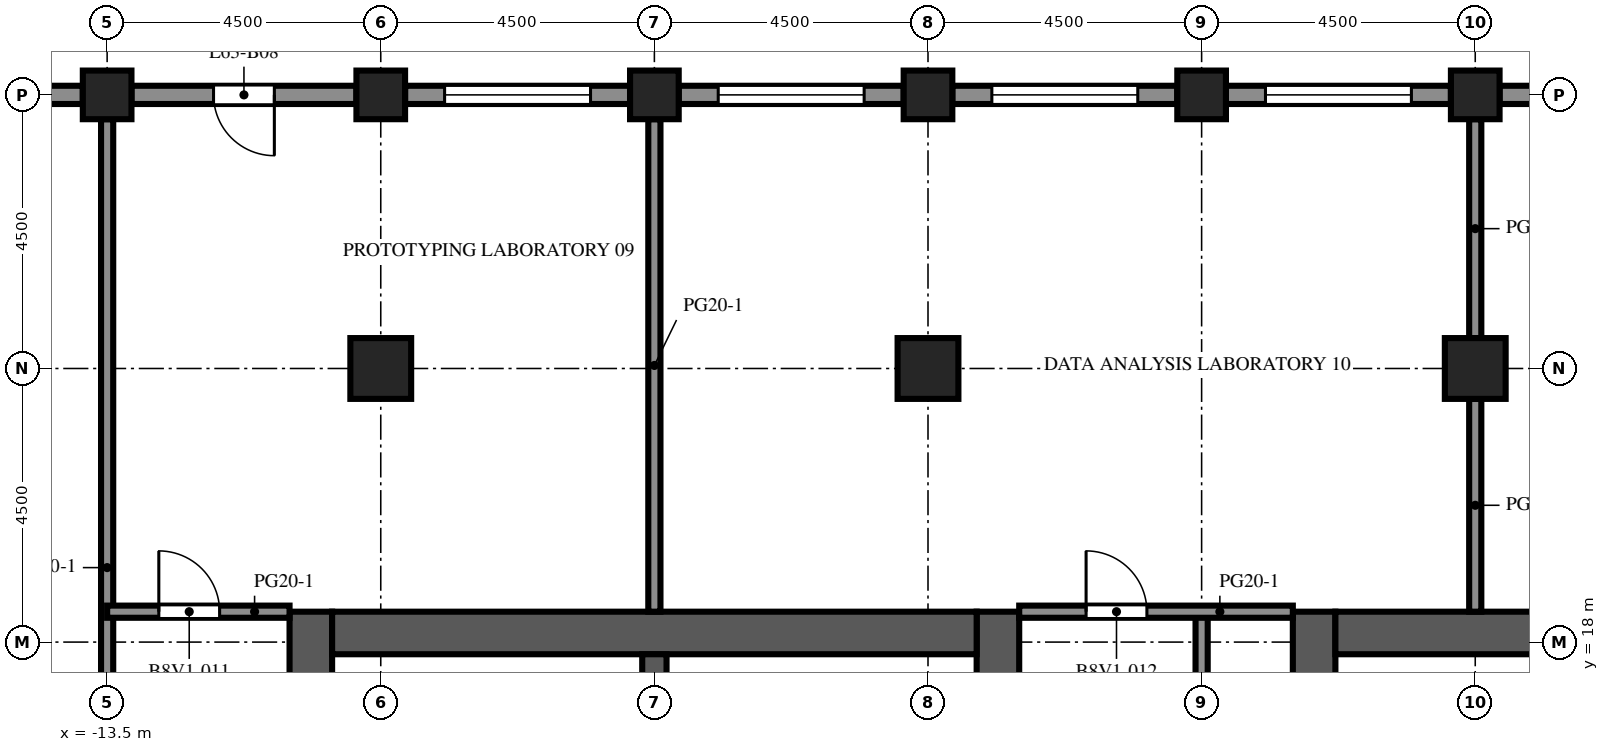
"""IFC4 building model, lengths in metres.
Left out: names, types, materials, properties, quantities, classifications, styles, units other than length and angle.
Written with IfcOpenShell. Run it as: python <this file> out.ifc"""

import sys

from ifc_helpers import new_model, si_unit, direction, frame, frame_2d, origin, origin_2d, place, context, subcontext, project, spatial, rectangle, extrude, element, fill, save


model = new_model("IFC4")
c1 = context("Model", 3, precision=1e-05, world=origin(), true_north=direction((0.0, 1.0)))
c2 = subcontext(c1, "Body", "Model", "MODEL_VIEW")
j1 = project(units=[si_unit("LENGTHUNIT", "METRE"), si_unit("PLANEANGLEUNIT", "RADIAN")], contexts=[c1])
p1 = place(None, origin())
s1 = spatial("IfcSite", under=j1, at=p1, CompositionType="ELEMENT")
p2 = place(p1, origin())
s2 = spatial("IfcBuilding", under=s1, at=p2, CompositionType="ELEMENT")
p3 = place(p2, frame((0.0, 0.0, 278.6)))
s3 = spatial("IfcBuildingStorey", under=s2, at=p3, CompositionType="ELEMENT", Elevation=278.6)
for number, where, z_axis, x_axis in (
    (1, (-13.5, 27.0, 0.0), (0.0, 0.0, 1.0), (1.0, 0.0, 0.0)),
    (2, (-9.0, 27.0, 0.0), (0.0, 0.0, 1.0), (1.0, 0.0, 0.0)),
    (3, (-4.5, 27.0, 0.0), (0.0, 0.0, 1.0), (1.0, 0.0, 0.0)),
    (4, (0.0, 27.0, 0.0), (0.0, 0.0, 1.0), (1.0, 0.0, 0.0)),
    (5, (4.5, 27.0, 0.0), (0.0, 0.0, 1.0), (1.0, 0.0, 0.0)),
    (6, (9.0, 27.0, 0.0), (0.0, 0.0, 1.0), (1.0, 0.0, 0.0)),
):
    element("IfcColumn", number, at=place(p3, frame(where, z_axis=z_axis, x_axis=x_axis)), inside=s3, PredefinedType="COLUMN", context=c2, shape_type="SweptSolid", body=[
        extrude(rectangle(XDim=0.8, YDim=0.8, at=origin_2d()), origin(), (0.0, 0.0, 1.0), 4.1),
    ])
for number, where, z_axis, x_axis in (
    (7, (-9.0, 22.5, 0.0), (0.0, 0.0, 1.0), (1.0, 0.0, 0.0)),
    (8, (0.0, 22.5, 0.0), (0.0, 0.0, 1.0), (1.0, 0.0, 0.0)),
    (9, (9.0, 22.5, 0.0), (0.0, 0.0, 1.0), (1.0, 0.0, 0.0)),
):
    element("IfcColumn", number, at=place(p3, frame(where, z_axis=z_axis, x_axis=x_axis)), inside=s3, PredefinedType="COLUMN", context=c2, shape_type="SweptSolid", body=[
        extrude(rectangle(XDim=1.0, YDim=1.0, at=origin_2d()), origin(), (0.0, 0.0, 1.0), 4.1),
    ])
p4 = place(p3, frame((-10.15, -9.0, 0.0), z_axis=(0.0, 0.0, 1.0), x_axis=(0.0, 1.0, 0.0)))
e10 = element("IfcWall", 10, at=p4, inside=s3, PredefinedType="SHEAR", context=c2, shape_type="SweptSolid", body=[
    extrude(rectangle(XDim=27.5, YDim=0.7, at=frame_2d((13.75, 0.0))), origin(), (0.0, 0.0, 1.0), 4.1),
])
p5 = place(p4, frame((12.55, 0.0, 0.0)))
e11 = element("IfcOpeningElement", 11, at=p5, cuts=e10, PredefinedType="OPENING", context=c2, shape_type="SweptSolid", body=[
    extrude(rectangle(XDim=2.4, YDim=2.4, at=frame_2d((1.2, 1.2))), frame((0.0, 0.36, 0.0), z_axis=(0.0, -1.0, 0.0), x_axis=(1.0, 0.0, 0.0)), (0.0, 0.0, 1.0), 0.72),
])
p6 = place(p4, frame((6.825, 0.0, 0.0)))
e12 = element("IfcOpeningElement", 12, at=p6, cuts=e10, PredefinedType="OPENING", context=c2, shape_type="SweptSolid", body=[
    extrude(rectangle(XDim=1.2, YDim=2.1, at=frame_2d((0.6, 1.05))), frame((0.0, 0.36, 0.0), z_axis=(0.0, -1.0, 0.0), x_axis=(1.0, 0.0, 0.0)), (0.0, 0.0, 1.0), 0.72),
])
p7 = place(p4, frame((19.475, 0.0, 0.0)))
e13 = element("IfcOpeningElement", 13, at=p7, cuts=e10, PredefinedType="OPENING", context=c2, shape_type="SweptSolid", body=[
    extrude(rectangle(XDim=1.2, YDim=2.1, at=frame_2d((0.6, 1.05))), frame((0.0, 0.36, 0.0), z_axis=(0.0, -1.0, 0.0), x_axis=(1.0, 0.0, 0.0)), (0.0, 0.0, 1.0), 0.72),
])
p8 = place(p3, frame((1.15, -9.0, 0.0), z_axis=(0.0, 0.0, 1.0), x_axis=(0.0, 1.0, 0.0)))
e14 = element("IfcWall", 14, at=p8, inside=s3, PredefinedType="SHEAR", context=c2, shape_type="SweptSolid", body=[
    extrude(rectangle(XDim=27.5, YDim=0.7, at=frame_2d((13.75, 0.0))), origin(), (0.0, 0.0, 1.0), 4.1),
])
p9 = place(p8, frame((12.55, 0.0, 0.0)))
e15 = element("IfcOpeningElement", 15, at=p9, cuts=e14, PredefinedType="OPENING", context=c2, shape_type="SweptSolid", body=[
    extrude(rectangle(XDim=2.4, YDim=2.4, at=frame_2d((1.2, 1.2))), frame((0.0, 0.36, 0.0), z_axis=(0.0, -1.0, 0.0), x_axis=(1.0, 0.0, 0.0)), (0.0, 0.0, 1.0), 0.72),
])
p10 = place(p8, frame((3.9, 0.0, 0.0)))
e16 = element("IfcOpeningElement", 16, at=p10, cuts=e14, PredefinedType="OPENING", context=c2, shape_type="SweptSolid", body=[
    extrude(rectangle(XDim=1.2, YDim=2.1, at=frame_2d((0.6, 1.05))), frame((0.0, 0.36, 0.0), z_axis=(0.0, -1.0, 0.0), x_axis=(1.0, 0.0, 0.0)), (0.0, 0.0, 1.0), 0.72),
])
p11 = place(p8, frame((19.46, 0.0, 0.0)))
e17 = element("IfcOpeningElement", 17, at=p11, cuts=e14, PredefinedType="OPENING", context=c2, shape_type="SweptSolid", body=[
    extrude(rectangle(XDim=1.0, YDim=2.1, at=frame_2d((0.5, 1.05))), frame((0.0, 0.36, 0.0), z_axis=(0.0, -1.0, 0.0), x_axis=(1.0, 0.0, 0.0)), (0.0, 0.0, 1.0), 0.72),
])
p12 = place(p8, frame((21.17, 0.0, 0.0)))
e18 = element("IfcOpeningElement", 18, at=p12, cuts=e14, PredefinedType="OPENING", context=c2, shape_type="SweptSolid", body=[
    extrude(rectangle(XDim=1.0, YDim=2.1, at=frame_2d((0.5, 1.05))), frame((0.0, 0.36, 0.0), z_axis=(0.0, -1.0, 0.0), x_axis=(1.0, 0.0, 0.0)), (0.0, 0.0, 1.0), 0.72),
])
p13 = place(p8, frame((23.26, 0.0, 0.0)))
e19 = element("IfcOpeningElement", 19, at=p13, cuts=e14, PredefinedType="OPENING", context=c2, shape_type="SweptSolid", body=[
    extrude(rectangle(XDim=1.0, YDim=2.1, at=frame_2d((0.5, 1.05))), frame((0.0, 0.36, 0.0), z_axis=(0.0, -1.0, 0.0), x_axis=(1.0, 0.0, 0.0)), (0.0, 0.0, 1.0), 0.72),
])
p14 = place(p8, frame((25.35, 0.0, 0.0)))
e20 = element("IfcOpeningElement", 20, at=p14, cuts=e14, PredefinedType="OPENING", context=c2, shape_type="SweptSolid", body=[
    extrude(rectangle(XDim=1.0, YDim=2.1, at=frame_2d((0.5, 1.05))), frame((0.0, 0.36, 0.0), z_axis=(0.0, -1.0, 0.0), x_axis=(1.0, 0.0, 0.0)), (0.0, 0.0, 1.0), 0.72),
])
p15 = place(p3, frame((-9.8, 18.15, 0.0), z_axis=(0.0, 0.0, 1.0), x_axis=(1.0, 0.0, 0.0)))
e21 = element("IfcWall", 21, at=p15, inside=s3, PredefinedType="SHEAR", context=c2, shape_type="SweptSolid", body=[
    extrude(rectangle(XDim=10.6, YDim=0.7, at=frame_2d((5.3, 0.0))), origin(), (0.0, 0.0, 1.0), 4.1),
])
p16 = place(p3, frame((-4.5, 10.2, 0.0), z_axis=(0.0, 0.0, 1.0), x_axis=(0.0, 1.0, 0.0)))
e22 = element("IfcWall", 22, at=p16, inside=s3, PredefinedType="SHEAR", context=c2, shape_type="SweptSolid", body=[
    extrude(rectangle(XDim=7.6, YDim=0.4, at=frame_2d((3.8, 0.0))), origin(), (0.0, 0.0, 1.0), 4.1),
])
p17 = place(p3, frame((6.35, -9.0, 0.0), z_axis=(0.0, 0.0, 1.0), x_axis=(0.0, 1.0, 0.0)))
e23 = element("IfcWall", 23, at=p17, inside=s3, PredefinedType="SHEAR", context=c2, shape_type="SweptSolid", body=[
    extrude(rectangle(XDim=27.5, YDim=0.7, at=frame_2d((13.75, 0.0))), origin(), (0.0, 0.0, 1.0), 4.1),
])
p18 = place(p17, frame((12.55, 0.0, 0.0)))
e24 = element("IfcOpeningElement", 24, at=p18, cuts=e23, PredefinedType="OPENING", context=c2, shape_type="SweptSolid", body=[
    extrude(rectangle(XDim=2.4, YDim=2.4, at=frame_2d((1.2, 1.2))), frame((0.0, 0.36, 0.0), z_axis=(0.0, -1.0, 0.0), x_axis=(1.0, 0.0, 0.0)), (0.0, 0.0, 1.0), 0.72),
])
p19 = place(p17, frame((3.9, 0.0, 0.0)))
e25 = element("IfcOpeningElement", 25, at=p19, cuts=e23, PredefinedType="OPENING", context=c2, shape_type="SweptSolid", body=[
    extrude(rectangle(XDim=1.2, YDim=2.1, at=frame_2d((0.6, 1.05))), frame((0.0, 0.36, 0.0), z_axis=(0.0, -1.0, 0.0), x_axis=(1.0, 0.0, 0.0)), (0.0, 0.0, 1.0), 0.72),
])
p20 = place(p17, frame((19.46, 0.0, 0.0)))
e26 = element("IfcOpeningElement", 26, at=p20, cuts=e23, PredefinedType="OPENING", context=c2, shape_type="SweptSolid", body=[
    extrude(rectangle(XDim=1.0, YDim=2.1, at=frame_2d((0.5, 1.05))), frame((0.0, 0.36, 0.0), z_axis=(0.0, -1.0, 0.0), x_axis=(1.0, 0.0, 0.0)), (0.0, 0.0, 1.0), 0.72),
])
p21 = place(p17, frame((21.17, 0.0, 0.0)))
e27 = element("IfcOpeningElement", 27, at=p21, cuts=e23, PredefinedType="OPENING", context=c2, shape_type="SweptSolid", body=[
    extrude(rectangle(XDim=1.0, YDim=2.1, at=frame_2d((0.5, 1.05))), frame((0.0, 0.36, 0.0), z_axis=(0.0, -1.0, 0.0), x_axis=(1.0, 0.0, 0.0)), (0.0, 0.0, 1.0), 0.72),
])
p22 = place(p17, frame((23.26, 0.0, 0.0)))
e28 = element("IfcOpeningElement", 28, at=p22, cuts=e23, PredefinedType="OPENING", context=c2, shape_type="SweptSolid", body=[
    extrude(rectangle(XDim=1.0, YDim=2.1, at=frame_2d((0.5, 1.05))), frame((0.0, 0.36, 0.0), z_axis=(0.0, -1.0, 0.0), x_axis=(1.0, 0.0, 0.0)), (0.0, 0.0, 1.0), 0.72),
])
p23 = place(p17, frame((25.35, 0.0, 0.0)))
e29 = element("IfcOpeningElement", 29, at=p23, cuts=e23, PredefinedType="OPENING", context=c2, shape_type="SweptSolid", body=[
    extrude(rectangle(XDim=1.0, YDim=2.1, at=frame_2d((0.5, 1.05))), frame((0.0, 0.36, 0.0), z_axis=(0.0, -1.0, 0.0), x_axis=(1.0, 0.0, 0.0)), (0.0, 0.0, 1.0), 0.72),
])
p24 = place(p3, frame((6.7, 18.15, 0.0), z_axis=(0.0, 0.0, 1.0), x_axis=(1.0, 0.0, 0.0)))
e30 = element("IfcWall", 30, at=p24, inside=s3, PredefinedType="SHEAR", context=c2, shape_type="SweptSolid", body=[
    extrude(rectangle(XDim=10.6, YDim=0.7, at=frame_2d((5.3, 0.0))), origin(), (0.0, 0.0, 1.0), 4.1),
])
p25 = place(p3, frame((9.4, 27.0, 0.0), z_axis=(0.0, 0.0, 1.0), x_axis=(1.0, 0.0, 0.0)))
e31 = element("IfcWall", 31, at=p25, inside=s3, PredefinedType="SOLIDWALL", context=c2, shape_type="SweptSolid", body=[
    extrude(rectangle(XDim=3.7, YDim=0.3, at=frame_2d((1.85, 0.0))), origin(), (0.0, 0.0, 1.0), 2.85),
])
p26 = place(p25, frame((1.35, 0.0, 0.0)))
e32 = element("IfcOpeningElement", 32, at=p26, cuts=e31, PredefinedType="OPENING", context=c2, shape_type="SweptSolid", body=[
    extrude(rectangle(XDim=1.0, YDim=2.2, at=frame_2d((0.5, 1.1))), frame((0.0, 0.16, 0.0), z_axis=(0.0, -1.0, 0.0), x_axis=(1.0, 0.0, 0.0)), (0.0, 0.0, 1.0), 0.32),
])
p27 = place(p3, frame((4.9, 27.0, 0.0), z_axis=(0.0, 0.0, 1.0), x_axis=(1.0, 0.0, 0.0)))
e33 = element("IfcWall", 33, at=p27, inside=s3, PredefinedType="SOLIDWALL", context=c2, shape_type="SweptSolid", body=[
    extrude(rectangle(XDim=3.7, YDim=0.3, at=frame_2d((1.85, 0.0))), origin(), (0.0, 0.0, 1.0), 2.85),
])
p28 = place(p27, frame((0.65, 0.0, 0.8)))
e34 = element("IfcOpeningElement", 34, at=p28, cuts=e33, PredefinedType="OPENING", context=c2, shape_type="SweptSolid", body=[
    extrude(rectangle(XDim=2.4, YDim=1.7, at=frame_2d((1.2, 0.85))), frame((0.0, 0.16, 0.0), z_axis=(0.0, -1.0, 0.0), x_axis=(1.0, 0.0, 0.0)), (0.0, 0.0, 1.0), 0.32),
])
p29 = place(p3, frame((0.4, 27.0, 0.0), z_axis=(0.0, 0.0, 1.0), x_axis=(1.0, 0.0, 0.0)))
e35 = element("IfcWall", 35, at=p29, inside=s3, PredefinedType="SOLIDWALL", context=c2, shape_type="SweptSolid", body=[
    extrude(rectangle(XDim=3.7, YDim=0.3, at=frame_2d((1.85, 0.0))), origin(), (0.0, 0.0, 1.0), 2.85),
])
p30 = place(p29, frame((0.65, 0.0, 0.8)))
e36 = element("IfcOpeningElement", 36, at=p30, cuts=e35, PredefinedType="OPENING", context=c2, shape_type="SweptSolid", body=[
    extrude(rectangle(XDim=2.4, YDim=1.7, at=frame_2d((1.2, 0.85))), frame((0.0, 0.16, 0.0), z_axis=(0.0, -1.0, 0.0), x_axis=(1.0, 0.0, 0.0)), (0.0, 0.0, 1.0), 0.32),
])
p31 = place(p3, frame((-4.1, 27.0, 0.0), z_axis=(0.0, 0.0, 1.0), x_axis=(1.0, 0.0, 0.0)))
e37 = element("IfcWall", 37, at=p31, inside=s3, PredefinedType="SOLIDWALL", context=c2, shape_type="SweptSolid", body=[
    extrude(rectangle(XDim=3.7, YDim=0.3, at=frame_2d((1.85, 0.0))), origin(), (0.0, 0.0, 1.0), 2.85),
])
p32 = place(p31, frame((0.65, 0.0, 0.8)))
e38 = element("IfcOpeningElement", 38, at=p32, cuts=e37, PredefinedType="OPENING", context=c2, shape_type="SweptSolid", body=[
    extrude(rectangle(XDim=2.4, YDim=1.7, at=frame_2d((1.2, 0.85))), frame((0.0, 0.16, 0.0), z_axis=(0.0, -1.0, 0.0), x_axis=(1.0, 0.0, 0.0)), (0.0, 0.0, 1.0), 0.32),
])
p33 = place(p3, frame((-8.6, 27.0, 0.0), z_axis=(0.0, 0.0, 1.0), x_axis=(1.0, 0.0, 0.0)))
e39 = element("IfcWall", 39, at=p33, inside=s3, PredefinedType="SOLIDWALL", context=c2, shape_type="SweptSolid", body=[
    extrude(rectangle(XDim=3.7, YDim=0.3, at=frame_2d((1.85, 0.0))), origin(), (0.0, 0.0, 1.0), 2.85),
])
p34 = place(p33, frame((0.65, 0.0, 0.8)))
e40 = element("IfcOpeningElement", 40, at=p34, cuts=e39, PredefinedType="OPENING", context=c2, shape_type="SweptSolid", body=[
    extrude(rectangle(XDim=2.4, YDim=1.7, at=frame_2d((1.2, 0.85))), frame((0.0, 0.16, 0.0), z_axis=(0.0, -1.0, 0.0), x_axis=(1.0, 0.0, 0.0)), (0.0, 0.0, 1.0), 0.32),
])
p35 = place(p3, frame((-13.1, 27.0, 0.0), z_axis=(0.0, 0.0, 1.0), x_axis=(1.0, 0.0, 0.0)))
e41 = element("IfcWall", 41, at=p35, inside=s3, PredefinedType="SOLIDWALL", context=c2, shape_type="SweptSolid", body=[
    extrude(rectangle(XDim=3.7, YDim=0.3, at=frame_2d((1.85, 0.0))), origin(), (0.0, 0.0, 1.0), 2.85),
])
p36 = place(p35, frame((1.35, 0.0, 0.0)))
e42 = element("IfcOpeningElement", 42, at=p36, cuts=e41, PredefinedType="OPENING", context=c2, shape_type="SweptSolid", body=[
    extrude(rectangle(XDim=1.0, YDim=2.2, at=frame_2d((0.5, 1.1))), frame((0.0, 0.16, 0.0), z_axis=(0.0, -1.0, 0.0), x_axis=(1.0, 0.0, 0.0)), (0.0, 0.0, 1.0), 0.32),
])
p37 = place(p3, frame((-17.6, 27.0, 0.0), z_axis=(0.0, 0.0, 1.0), x_axis=(1.0, 0.0, 0.0)))
e43 = element("IfcWall", 43, at=p37, inside=s3, PredefinedType="SOLIDWALL", context=c2, shape_type="SweptSolid", body=[
    extrude(rectangle(XDim=3.7, YDim=0.3, at=frame_2d((1.85, 0.0))), origin(), (0.0, 0.0, 1.0), 2.85),
])
p38 = place(p37, frame((0.65, 0.0, 0.8)))
e44 = element("IfcOpeningElement", 44, at=p38, cuts=e43, PredefinedType="OPENING", context=c2, shape_type="SweptSolid", body=[
    extrude(rectangle(XDim=2.4, YDim=1.7, at=frame_2d((1.2, 0.85))), frame((0.0, 0.16, 0.0), z_axis=(0.0, -1.0, 0.0), x_axis=(1.0, 0.0, 0.0)), (0.0, 0.0, 1.0), 0.32),
])
p39 = place(p3, frame((-13.5, 6.25, 0.0), z_axis=(0.0, 0.0, 1.0), x_axis=(0.0, 1.0, 0.0)))
e45 = element("IfcWall", 45, at=p39, inside=s3, PredefinedType="PARTITIONING", context=c2, shape_type="SweptSolid", body=[
    extrude(rectangle(XDim=20.35, YDim=0.2, at=frame_2d((10.175, 0.0))), origin(), (0.0, 0.0, 1.0), 3.65),
])
p40 = place(p39, frame((4.6, 0.0, 0.0)))
e46 = element("IfcOpeningElement", 46, at=p40, cuts=e45, PredefinedType="OPENING", context=c2, shape_type="SweptSolid", body=[
    extrude(rectangle(XDim=1.0, YDim=2.1, at=frame_2d((0.5, 1.05))), frame((0.0, 0.11, 0.0), z_axis=(0.0, -1.0, 0.0), x_axis=(1.0, 0.0, 0.0)), (0.0, 0.0, 1.0), 0.22),
])
p41 = place(p3, frame((-4.5, 18.5, 0.0), z_axis=(0.0, 0.0, 1.0), x_axis=(0.0, 1.0, 0.0)))
e47 = element("IfcWall", 47, at=p41, inside=s3, PredefinedType="PARTITIONING", context=c2, shape_type="SweptSolid", body=[
    extrude(rectangle(XDim=8.1, YDim=0.2, at=frame_2d((4.05, 0.0))), origin(), (0.0, 0.0, 1.0), 3.65),
])
p42 = place(p3, frame((4.5, 18.5, 0.0), z_axis=(0.0, 0.0, 1.0), x_axis=(0.0, -1.0, 0.0)))
e48 = element("IfcWall", 48, at=p42, inside=s3, PredefinedType="PARTITIONING", context=c2, shape_type="SweptSolid", body=[
    extrude(rectangle(XDim=11.8, YDim=0.2, at=frame_2d((5.9, 0.0))), origin(), (0.0, 0.0, 1.0), 3.65),
])
p43 = place(p42, frame((4.7, 0.0, 0.0)))
e49 = element("IfcOpeningElement", 49, at=p43, cuts=e48, PredefinedType="OPENING", context=c2, shape_type="SweptSolid", body=[
    extrude(rectangle(XDim=1.0, YDim=2.1, at=frame_2d((0.5, 1.05))), frame((0.0, 0.11, 0.0), z_axis=(0.0, -1.0, 0.0), x_axis=(1.0, 0.0, 0.0)), (0.0, 0.0, 1.0), 0.22),
])
p44 = place(p3, frame((9.0, 18.5, 0.0), z_axis=(0.0, 0.0, 1.0), x_axis=(0.0, 1.0, 0.0)))
e50 = element("IfcWall", 50, at=p44, inside=s3, PredefinedType="PARTITIONING", context=c2, shape_type="SweptSolid", body=[
    extrude(rectangle(XDim=3.5, YDim=0.2, at=frame_2d((1.75, 0.0))), origin(), (0.0, 0.0, 1.0), 3.65),
])
p45 = place(p3, frame((9.0, 23.0, 0.0), z_axis=(0.0, 0.0, 1.0), x_axis=(0.0, 1.0, 0.0)))
e51 = element("IfcWall", 51, at=p45, inside=s3, PredefinedType="PARTITIONING", context=c2, shape_type="SweptSolid", body=[
    extrude(rectangle(XDim=3.6, YDim=0.2, at=frame_2d((1.8, 0.0))), origin(), (0.0, 0.0, 1.0), 3.65),
])
p46 = place(p3, frame((-13.5, 18.5, 0.0), z_axis=(0.0, 0.0, 1.0), x_axis=(1.0, 0.0, 0.0)))
e52 = element("IfcWall", 52, at=p46, inside=s3, PredefinedType="PARTITIONING", context=c2, shape_type="SweptSolid", body=[
    extrude(rectangle(XDim=3.0, YDim=0.2, at=frame_2d((1.5, 0.0))), origin(), (0.0, 0.0, 1.0), 3.65),
])
p47 = place(p46, frame((0.85, 0.0, 0.0)))
e53 = element("IfcOpeningElement", 53, at=p47, cuts=e52, PredefinedType="OPENING", context=c2, shape_type="SweptSolid", body=[
    extrude(rectangle(XDim=1.0, YDim=2.1, at=frame_2d((0.5, 1.05))), frame((0.0, 0.11, 0.0), z_axis=(0.0, -1.0, 0.0), x_axis=(1.0, 0.0, 0.0)), (0.0, 0.0, 1.0), 0.22),
])
p48 = place(p3, frame((1.5, 18.5, 0.0), z_axis=(0.0, 0.0, 1.0), x_axis=(1.0, 0.0, 0.0)))
e54 = element("IfcWall", 54, at=p48, inside=s3, PredefinedType="PARTITIONING", context=c2, shape_type="SweptSolid", body=[
    extrude(rectangle(XDim=4.5, YDim=0.2, at=frame_2d((2.25, 0.0))), origin(), (0.0, 0.0, 1.0), 3.65),
])
p49 = place(p48, frame((1.1, 0.0, 0.0)))
e55 = element("IfcOpeningElement", 55, at=p49, cuts=e54, PredefinedType="OPENING", context=c2, shape_type="SweptSolid", body=[
    extrude(rectangle(XDim=1.0, YDim=2.1, at=frame_2d((0.5, 1.05))), frame((0.0, 0.11, 0.0), z_axis=(0.0, -1.0, 0.0), x_axis=(1.0, 0.0, 0.0)), (0.0, 0.0, 1.0), 0.22),
])
p50 = place(p28, origin())
e56 = element("IfcWindow", 56, at=p50, inside=s3, PartitioningType="SINGLE_PANEL", PredefinedType="WINDOW", context=c2, shape_type="SweptSolid", body=[
    extrude(rectangle(XDim=2.4, YDim=1.7, at=frame_2d((1.2, 0.85))), frame((0.0, 0.03, 0.0), z_axis=(0.0, -1.0, 0.0), x_axis=(1.0, 0.0, 0.0)), (0.0, 0.0, 1.0), 0.06),
])
fill(e34, e56)
p51 = place(p30, origin())
e57 = element("IfcWindow", 57, at=p51, inside=s3, PartitioningType="SINGLE_PANEL", PredefinedType="WINDOW", context=c2, shape_type="SweptSolid", body=[
    extrude(rectangle(XDim=2.4, YDim=1.7, at=frame_2d((1.2, 0.85))), frame((0.0, 0.03, 0.0), z_axis=(0.0, -1.0, 0.0), x_axis=(1.0, 0.0, 0.0)), (0.0, 0.0, 1.0), 0.06),
])
fill(e36, e57)
p52 = place(p32, origin())
e58 = element("IfcWindow", 58, at=p52, inside=s3, PartitioningType="SINGLE_PANEL", PredefinedType="WINDOW", context=c2, shape_type="SweptSolid", body=[
    extrude(rectangle(XDim=2.4, YDim=1.7, at=frame_2d((1.2, 0.85))), frame((0.0, 0.03, 0.0), z_axis=(0.0, -1.0, 0.0), x_axis=(1.0, 0.0, 0.0)), (0.0, 0.0, 1.0), 0.06),
])
fill(e38, e58)
p53 = place(p34, origin())
e59 = element("IfcWindow", 59, at=p53, inside=s3, PartitioningType="SINGLE_PANEL", PredefinedType="WINDOW", context=c2, shape_type="SweptSolid", body=[
    extrude(rectangle(XDim=2.4, YDim=1.7, at=frame_2d((1.2, 0.85))), frame((0.0, 0.03, 0.0), z_axis=(0.0, -1.0, 0.0), x_axis=(1.0, 0.0, 0.0)), (0.0, 0.0, 1.0), 0.06),
])
fill(e40, e59)
p54 = place(p36, origin())
e60 = element("IfcDoor", 60, at=p54, inside=s3, OperationType="SINGLE_SWING_RIGHT", PredefinedType="DOOR", context=c2, shape_type="SweptSolid", body=[
    extrude(rectangle(XDim=1.0, YDim=2.2, at=frame_2d((0.5, 1.1))), frame((0.0, 0.025, 0.0), z_axis=(0.0, -1.0, 0.0), x_axis=(1.0, 0.0, 0.0)), (0.0, 0.0, 1.0), 0.05),
])
fill(e42, e60)
p55 = place(p47, origin())
e61 = element("IfcDoor", 61, at=p55, inside=s3, OperationType="SINGLE_SWING_LEFT", PredefinedType="DOOR", context=c2, shape_type="SweptSolid", body=[
    extrude(rectangle(XDim=1.0, YDim=2.1, at=frame_2d((0.5, 1.05))), frame((0.0, 0.025, 0.0), z_axis=(0.0, -1.0, 0.0), x_axis=(1.0, 0.0, 0.0)), (0.0, 0.0, 1.0), 0.05),
])
fill(e53, e61)
p56 = place(p49, origin())
e62 = element("IfcDoor", 62, at=p56, inside=s3, OperationType="SINGLE_SWING_LEFT", PredefinedType="DOOR", context=c2, shape_type="SweptSolid", body=[
    extrude(rectangle(XDim=1.0, YDim=2.1, at=frame_2d((0.5, 1.05))), frame((0.0, 0.025, 0.0), z_axis=(0.0, -1.0, 0.0), x_axis=(1.0, 0.0, 0.0)), (0.0, 0.0, 1.0), 0.05),
])
fill(e55, e62)
save(model, sys.argv[1])
